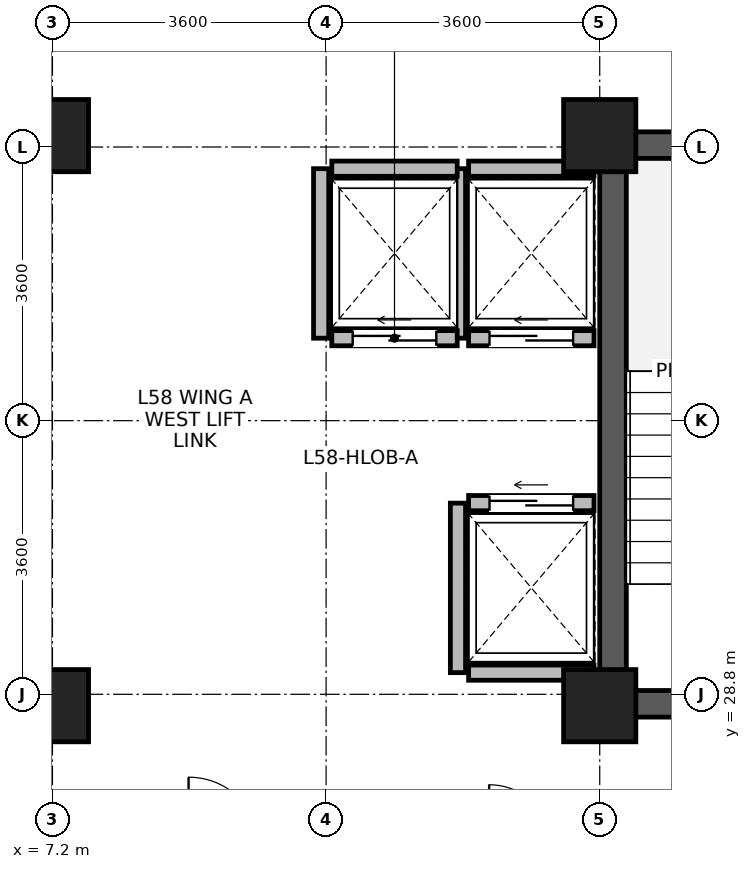
"""IFC4 building model, lengths in metres.
Left out: names, types, materials, properties, quantities, classifications, styles, units other than length and angle.
Written with IfcOpenShell. Run it as: python <this file> out.ifc"""

import sys

from ifc_helpers import new_model, si_unit, direction, frame, frame_2d, origin, origin_2d, place, context, subcontext, project, spatial, rectangle, extrude, source, transform, mapped, element, fill, save


model = new_model("IFC4")
c1 = context("Model", 3, precision=1e-05, world=origin(), true_north=direction((0.0, 1.0)))
c2 = subcontext(c1, "Body", "Model", "MODEL_VIEW")
j1 = project(units=[si_unit("LENGTHUNIT", "METRE"), si_unit("PLANEANGLEUNIT", "RADIAN")], contexts=[c1])
p1 = place(None, origin())
s1 = spatial("IfcSite", under=j1, at=p1, CompositionType="ELEMENT")
p2 = place(p1, origin())
s2 = spatial("IfcBuilding", under=s1, at=p2, CompositionType="ELEMENT")
p3 = place(p2, frame((0.0, 0.0, 227.7)))
s3 = spatial("IfcBuildingStorey", under=s2, at=p3, CompositionType="ELEMENT", Elevation=227.7)
p4 = place(p3, frame((14.575, 28.5, 0.0), z_axis=(0.0, 0.0, 1.0), x_axis=(0.0, 1.0, 0.0)))
e1 = element("IfcWall", 1, at=p4, inside=s3, PredefinedType="SHEAR", context=c2, shape_type="SweptSolid", body=[
    extrude(rectangle(XDim=7.7, YDim=0.35, at=frame_2d((3.85, 0.0))), origin(), (0.0, 0.0, 1.0), 3.47),
])
for number, where, z_axis, x_axis in (
    (2, (14.75, 28.675, 0.0), (0.0, 0.0, 1.0), (1.0, 0.0, 0.0)),
    (3, (14.75, 36.025, 0.0), (0.0, 0.0, 1.0), (1.0, 0.0, 0.0)),
):
    element("IfcWall", number, at=place(p3, frame(where, z_axis=z_axis, x_axis=x_axis)), inside=s3, PredefinedType="SHEAR", context=c2, shape_type="SweptSolid", body=[
        extrude(rectangle(XDim=3.2, YDim=0.35, at=frame_2d((1.6, 0.0))), origin(), (0.0, 0.0, 1.0), 3.47),
    ])
m1 = source(origin(), c2, "Body", "SweptSolid", [
    extrude(rectangle(XDim=0.95, YDim=0.95, at=origin_2d()), origin(), (0.0, 0.0, 1.0), 3.7),
])
for number, where, z_axis, x_axis in (
    (4, (7.2, 28.65, 0.0), (0.0, 0.0, 1.0), (1.0, 0.0, 0.0)),
    (5, (7.2, 36.15, 0.0), (0.0, 0.0, 1.0), (1.0, 0.0, 0.0)),
    (6, (14.4, 28.65, 0.0), (0.0, 0.0, 1.0), (1.0, 0.0, 0.0)),
    (7, (14.4, 36.15, 0.0), (0.0, 0.0, 1.0), (1.0, 0.0, 0.0)),
):
    element("IfcColumn", number, at=place(p3, frame(where, z_axis=z_axis, x_axis=x_axis)), inside=s3, PredefinedType="COLUMN", context=c2, shape_type="MappedRepresentation", body=[
        mapped(m1, transform((0.0, 0.0, 0.0), x_axis=(1.0, 0.0, 0.0), y_axis=(0.0, 1.0, 0.0), z_axis=(0.0, 0.0, 1.0), scale=1.0)),
    ])
p5 = place(p3, frame((12.675, 33.485, 0.0), z_axis=(0.0, 0.0, 1.0), x_axis=(1.0, 0.0, 0.0)))
e8 = element("IfcWall", 8, at=p5, inside=s3, PredefinedType="PARTITIONING", context=c2, shape_type="SweptSolid", body=[
    extrude(rectangle(XDim=1.65, YDim=0.2, at=frame_2d((0.825, 0.0))), origin(), (0.0, 0.0, 1.0), 3.45),
])
p6 = place(p5, frame((0.275, 0.0, 0.0)))
e9 = element("IfcOpeningElement", 9, at=p6, cuts=e8, PredefinedType="OPENING", context=c2, shape_type="SweptSolid", body=[
    extrude(rectangle(XDim=1.1, YDim=2.12, at=frame_2d((0.55, 1.06))), frame((0.0, 0.11, 0.0), z_axis=(0.0, -1.0, 0.0), x_axis=(1.0, 0.0, 0.0)), (0.0, 0.0, 1.0), 0.22),
])
p7 = place(p3, frame((12.675, 35.715, 0.0), z_axis=(0.0, 0.0, 1.0), x_axis=(1.0, 0.0, 0.0)))
e10 = element("IfcWall", 10, at=p7, inside=s3, PredefinedType="PARTITIONING", context=c2, shape_type="SweptSolid", body=[
    extrude(rectangle(XDim=1.65, YDim=0.2, at=frame_2d((0.825, 0.0))), origin(), (0.0, 0.0, 1.0), 3.45),
])
p8 = place(p3, frame((12.535, 33.485, 0.0), z_axis=(0.0, 0.0, 1.0), x_axis=(0.0, 1.0, 0.0)))
e11 = element("IfcWall", 11, at=p8, inside=s3, PredefinedType="PARTITIONING", context=c2, shape_type="SweptSolid", body=[
    extrude(rectangle(XDim=2.23, YDim=0.2, at=frame_2d((1.115, 0.0))), origin(), (0.0, 0.0, 1.0), 3.45),
])
p9 = place(p3, frame((12.675, 29.085, 0.0), z_axis=(0.0, 0.0, 1.0), x_axis=(1.0, 0.0, 0.0)))
e12 = element("IfcWall", 12, at=p9, inside=s3, PredefinedType="PARTITIONING", context=c2, shape_type="SweptSolid", body=[
    extrude(rectangle(XDim=1.65, YDim=0.2, at=frame_2d((0.825, 0.0))), origin(), (0.0, 0.0, 1.0), 3.45),
])
p10 = place(p3, frame((12.675, 31.315, 0.0), z_axis=(0.0, 0.0, 1.0), x_axis=(1.0, 0.0, 0.0)))
e13 = element("IfcWall", 13, at=p10, inside=s3, PredefinedType="PARTITIONING", context=c2, shape_type="SweptSolid", body=[
    extrude(rectangle(XDim=1.65, YDim=0.2, at=frame_2d((0.825, 0.0))), origin(), (0.0, 0.0, 1.0), 3.45),
])
p11 = place(p10, frame((0.275, 0.0, 0.0)))
e14 = element("IfcOpeningElement", 14, at=p11, cuts=e13, PredefinedType="OPENING", context=c2, shape_type="SweptSolid", body=[
    extrude(rectangle(XDim=1.1, YDim=2.12, at=frame_2d((0.55, 1.06))), frame((0.0, 0.11, 0.0), z_axis=(0.0, -1.0, 0.0), x_axis=(1.0, 0.0, 0.0)), (0.0, 0.0, 1.0), 0.22),
])
p12 = place(p3, frame((12.535, 29.085, 0.0), z_axis=(0.0, 0.0, 1.0), x_axis=(0.0, 1.0, 0.0)))
e15 = element("IfcWall", 15, at=p12, inside=s3, PredefinedType="PARTITIONING", context=c2, shape_type="SweptSolid", body=[
    extrude(rectangle(XDim=2.23, YDim=0.2, at=frame_2d((1.115, 0.0))), origin(), (0.0, 0.0, 1.0), 3.45),
])
p13 = place(p3, frame((10.875, 33.485, 0.0), z_axis=(0.0, 0.0, 1.0), x_axis=(1.0, 0.0, 0.0)))
e16 = element("IfcWall", 16, at=p13, inside=s3, PredefinedType="PARTITIONING", context=c2, shape_type="SweptSolid", body=[
    extrude(rectangle(XDim=1.65, YDim=0.2, at=frame_2d((0.825, 0.0))), origin(), (0.0, 0.0, 1.0), 3.45),
])
p14 = place(p13, frame((0.275, 0.0, 0.0)))
e17 = element("IfcOpeningElement", 17, at=p14, cuts=e16, PredefinedType="OPENING", context=c2, shape_type="SweptSolid", body=[
    extrude(rectangle(XDim=1.1, YDim=2.12, at=frame_2d((0.55, 1.06))), frame((0.0, 0.11, 0.0), z_axis=(0.0, -1.0, 0.0), x_axis=(1.0, 0.0, 0.0)), (0.0, 0.0, 1.0), 0.22),
])
p15 = place(p3, frame((10.875, 35.715, 0.0), z_axis=(0.0, 0.0, 1.0), x_axis=(1.0, 0.0, 0.0)))
e18 = element("IfcWall", 18, at=p15, inside=s3, PredefinedType="PARTITIONING", context=c2, shape_type="SweptSolid", body=[
    extrude(rectangle(XDim=1.65, YDim=0.2, at=frame_2d((0.825, 0.0))), origin(), (0.0, 0.0, 1.0), 3.45),
])
p16 = place(p3, frame((10.735, 33.485, 0.0), z_axis=(0.0, 0.0, 1.0), x_axis=(0.0, 1.0, 0.0)))
e19 = element("IfcWall", 19, at=p16, inside=s3, PredefinedType="PARTITIONING", context=c2, shape_type="SweptSolid", body=[
    extrude(rectangle(XDim=2.23, YDim=0.2, at=frame_2d((1.115, 0.0))), origin(), (0.0, 0.0, 1.0), 3.45),
])
p17 = place(p6, origin())
e20 = element("IfcDoor", 20, at=p17, inside=s3, OperationType="SLIDING_TO_LEFT", PredefinedType="DOOR", context=c2, shape_type="SweptSolid", body=[
    extrude(rectangle(XDim=1.1, YDim=2.12, at=frame_2d((0.55, 1.06))), frame((0.0, 0.025, 0.0), z_axis=(0.0, -1.0, 0.0), x_axis=(1.0, 0.0, 0.0)), (0.0, 0.0, 1.0), 0.05),
])
fill(e9, e20)
p18 = place(p11, origin())
e21 = element("IfcDoor", 21, at=p18, inside=s3, OperationType="SLIDING_TO_LEFT", PredefinedType="DOOR", context=c2, shape_type="SweptSolid", body=[
    extrude(rectangle(XDim=1.1, YDim=2.12, at=frame_2d((0.55, 1.06))), frame((0.0, 0.025, 0.0), z_axis=(0.0, -1.0, 0.0), x_axis=(1.0, 0.0, 0.0)), (0.0, 0.0, 1.0), 0.05),
])
fill(e14, e21)
p19 = place(p14, origin())
e22 = element("IfcDoor", 22, at=p19, inside=s3, OperationType="SLIDING_TO_LEFT", PredefinedType="DOOR", context=c2, shape_type="SweptSolid", body=[
    extrude(rectangle(XDim=1.1, YDim=2.12, at=frame_2d((0.55, 1.06))), frame((0.0, 0.025, 0.0), z_axis=(0.0, -1.0, 0.0), x_axis=(1.0, 0.0, 0.0)), (0.0, 0.0, 1.0), 0.05),
])
fill(e17, e22)
save(model, sys.argv[1])
